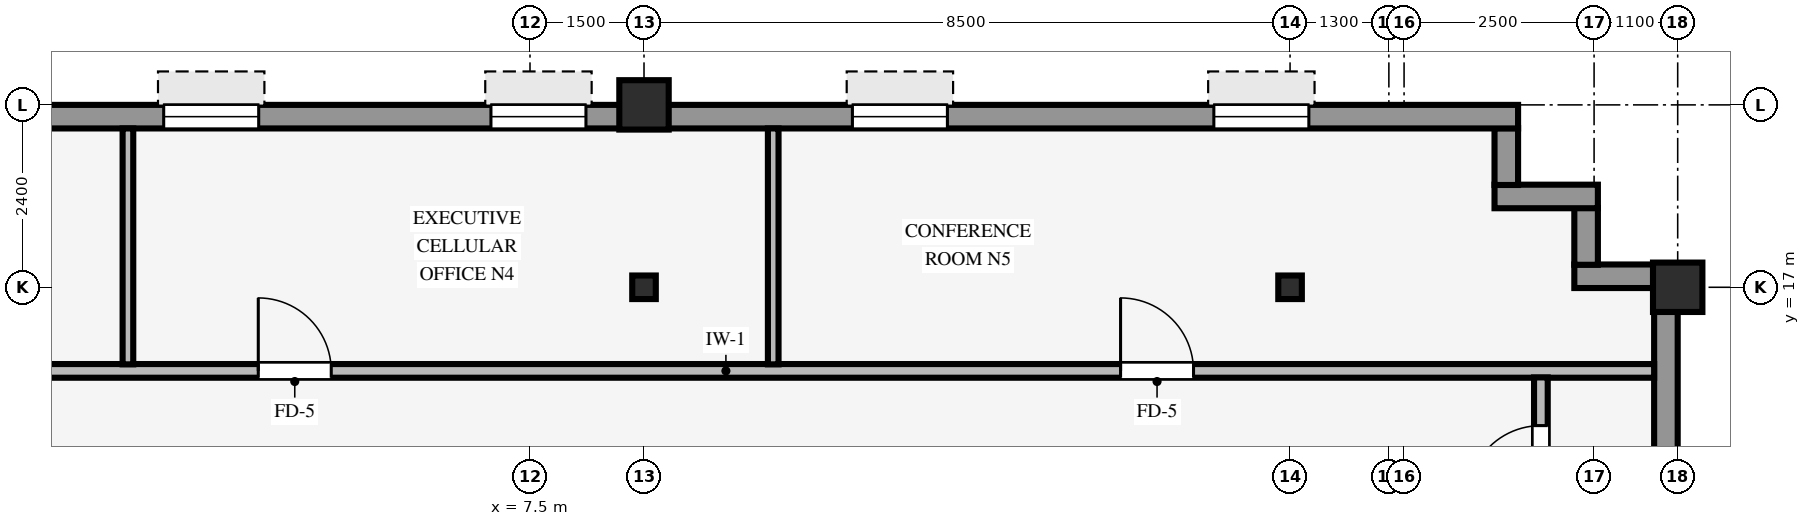
"""IFC4 building model, lengths in metres.
Left out: names, types, materials, properties, quantities, classifications, styles, units other than length and angle.
Written with IfcOpenShell. Run it as: python <this file> out.ifc"""

import sys

from ifc_helpers import new_model, si_unit, direction, frame, frame_2d, origin, origin_2d, place, context, subcontext, project, spatial, rectangle, hollow_rectangle, i_section, extrude, source, transform, mapped, element, fill, save


model = new_model("IFC4")
c1 = context("Model", 3, precision=1e-05, world=origin(), true_north=direction((0.0, 1.0)))
c2 = subcontext(c1, "Body", "Model", "MODEL_VIEW")
j1 = project(units=[si_unit("LENGTHUNIT", "METRE"), si_unit("PLANEANGLEUNIT", "RADIAN")], contexts=[c1])
p1 = place(None, origin())
s1 = spatial("IfcSite", under=j1, at=p1, CompositionType="ELEMENT")
p2 = place(p1, origin())
s2 = spatial("IfcBuilding", under=s1, at=p2, CompositionType="ELEMENT")
p3 = place(p2, frame((0.0, 0.0, 182.25)))
s3 = spatial("IfcBuildingStorey", under=s2, at=p3, CompositionType="ELEMENT", Elevation=182.25)
for number, where, z_axis, x_axis in (
    (1, (22.6, 17.0, 0.0), (0.0, 0.0, 1.0), (1.0, 0.0, 0.0)),
    (2, (9.0, 19.4, 0.0), (0.0, 0.0, 1.0), (1.0, 0.0, 0.0)),
):
    element("IfcColumn", number, at=place(p3, frame(where, z_axis=z_axis, x_axis=x_axis)), inside=s3, PredefinedType="COLUMN", context=c2, shape_type="SweptSolid", body=[
        extrude(hollow_rectangle(XDim=0.65, YDim=0.65, WallThickness=0.04, InnerFilletRadius=0.04, OuterFilletRadius=0.08, at=origin_2d()), origin(), (0.0, 0.0, 1.0), 3.25),
    ])
for number, where, z_axis, x_axis in (
    (3, (9.0, 17.0, 0.0), (0.0, 0.0, 1.0), (1.0, 0.0, 0.0)),
    (4, (17.5, 17.0, 0.0), (0.0, 0.0, 1.0), (1.0, 0.0, 0.0)),
):
    element("IfcColumn", number, at=place(p3, frame(where, z_axis=z_axis, x_axis=x_axis)), inside=s3, PredefinedType="COLUMN", context=c2, shape_type="SweptSolid", body=[
        extrude(i_section(OverallWidth=0.31, OverallDepth=0.31, WebThickness=0.015, FlangeThickness=0.015, FilletRadius=0.015, at=origin_2d()), origin(), (0.0, 0.0, 1.0), 3.25),
    ])
p4 = place(p3, frame((22.445, -20.794, 0.0), z_axis=(0.0, 0.0, 1.0), x_axis=(0.0, 1.0, 0.0)))
e5 = element("IfcWall", 5, at=p4, inside=s3, PredefinedType="STANDARD", context=c2, shape_type="SweptSolid", body=[
    extrude(rectangle(XDim=37.788, YDim=0.31, at=frame_2d((18.894, 0.0))), origin(), (0.0, 0.0, 1.0), 2.585),
])
p5 = place(p4, frame((16.444, 0.0, 0.0), z_axis=(0.0, 0.0, 1.0), x_axis=(-1.0, 0.0, 0.0)))
e6 = element("IfcOpeningElement", 6, at=p5, cuts=e5, PredefinedType="OPENING", context=c2, shape_type="SweptSolid", body=[
    extrude(rectangle(XDim=1.05, YDim=2.1, at=frame_2d((0.525, 1.05))), frame((0.0, 0.165, 0.0), z_axis=(0.0, -1.0, 0.0), x_axis=(1.0, 0.0, 0.0)), (0.0, 0.0, 1.0), 0.33),
])
p6 = place(p4, frame((7.644, 0.0, 0.8)))
e7 = element("IfcOpeningElement", 7, at=p6, cuts=e5, PredefinedType="OPENING", context=c2, shape_type="SweptSolid", body=[
    extrude(rectangle(XDim=2.05, YDim=1.52, at=frame_2d((1.025, 0.76))), frame((0.0, 0.165, 0.0), z_axis=(0.0, -1.0, 0.0), x_axis=(1.0, 0.0, 0.0)), (0.0, 0.0, 1.0), 0.33),
])
p7 = place(p4, frame((12.756, 0.0, 0.8)))
e8 = element("IfcOpeningElement", 8, at=p7, cuts=e5, PredefinedType="OPENING", context=c2, shape_type="SweptSolid", body=[
    extrude(rectangle(XDim=2.05, YDim=1.52, at=frame_2d((1.025, 0.76))), frame((0.0, 0.165, 0.0), z_axis=(0.0, -1.0, 0.0), x_axis=(1.0, 0.0, 0.0)), (0.0, 0.0, 1.0), 0.33),
])
p8 = place(p4, frame((17.869, 0.0, 0.8)))
e9 = element("IfcOpeningElement", 9, at=p8, cuts=e5, PredefinedType="OPENING", context=c2, shape_type="SweptSolid", body=[
    extrude(rectangle(XDim=2.05, YDim=1.52, at=frame_2d((1.025, 0.76))), frame((0.0, 0.165, 0.0), z_axis=(0.0, -1.0, 0.0), x_axis=(1.0, 0.0, 0.0)), (0.0, 0.0, 1.0), 0.33),
])
p9 = place(p4, frame((22.982, 0.0, 0.8)))
e10 = element("IfcOpeningElement", 10, at=p9, cuts=e5, PredefinedType="OPENING", context=c2, shape_type="SweptSolid", body=[
    extrude(rectangle(XDim=2.05, YDim=1.52, at=frame_2d((1.025, 0.76))), frame((0.0, 0.165, 0.0), z_axis=(0.0, -1.0, 0.0), x_axis=(1.0, 0.0, 0.0)), (0.0, 0.0, 1.0), 0.33),
])
p10 = place(p4, frame((27.194, 0.0, 0.8)))
e11 = element("IfcOpeningElement", 11, at=p10, cuts=e5, PredefinedType="OPENING", context=c2, shape_type="SweptSolid", body=[
    extrude(rectangle(XDim=2.05, YDim=1.52, at=frame_2d((1.025, 0.76))), frame((0.0, 0.165, 0.0), z_axis=(0.0, -1.0, 0.0), x_axis=(1.0, 0.0, 0.0)), (0.0, 0.0, 1.0), 0.33),
])
p11 = place(p4, frame((33.207, 0.0, 0.8)))
e12 = element("IfcOpeningElement", 12, at=p11, cuts=e5, PredefinedType="OPENING", context=c2, shape_type="SweptSolid", body=[
    extrude(rectangle(XDim=2.05, YDim=1.52, at=frame_2d((1.025, 0.76))), frame((0.0, 0.165, 0.0), z_axis=(0.0, -1.0, 0.0), x_axis=(1.0, 0.0, 0.0)), (0.0, 0.0, 1.0), 0.33),
])
p12 = place(p3, frame((21.24, 17.145, 0.0), z_axis=(0.0, 0.0, 1.0), x_axis=(1.0, 0.0, 0.0)))
e13 = element("IfcWall", 13, at=p12, inside=s3, PredefinedType="STANDARD", context=c2, shape_type="SweptSolid", body=[
    extrude(rectangle(XDim=1.36, YDim=0.31, at=frame_2d((0.68, 0.0))), origin(), (0.0, 0.0, 1.0), 2.335),
])
p13 = place(p3, frame((21.395, 17.296, 0.0), z_axis=(0.0, 0.0, 1.0), x_axis=(0.0, 1.0, 0.0)))
e14 = element("IfcWall", 14, at=p13, inside=s3, PredefinedType="STANDARD", context=c2, shape_type="SweptSolid", body=[
    extrude(rectangle(XDim=0.748, YDim=0.31, at=frame_2d((0.374, 0.0))), origin(), (0.0, 0.0, 1.0), 2.335),
])
p14 = place(p3, frame((20.19, 18.195, 0.0), z_axis=(0.0, 0.0, 1.0), x_axis=(1.0, 0.0, 0.0)))
e15 = element("IfcWall", 15, at=p14, inside=s3, PredefinedType="STANDARD", context=c2, shape_type="SweptSolid", body=[
    extrude(rectangle(XDim=1.36, YDim=0.31, at=frame_2d((0.68, 0.0))), origin(), (0.0, 0.0, 1.0), 2.335),
])
p15 = place(p3, frame((20.345, 18.346, 0.0), z_axis=(0.0, 0.0, 1.0), x_axis=(0.0, 1.0, 0.0)))
e16 = element("IfcWall", 16, at=p15, inside=s3, PredefinedType="STANDARD", context=c2, shape_type="SweptSolid", body=[
    extrude(rectangle(XDim=0.748, YDim=0.31, at=frame_2d((0.374, 0.0))), origin(), (0.0, 0.0, 1.0), 2.335),
])
p16 = place(p3, frame((-24.3, 19.245, 0.0), z_axis=(0.0, 0.0, 1.0), x_axis=(1.0, 0.0, 0.0)))
e17 = element("IfcWall", 17, at=p16, inside=s3, PredefinedType="STANDARD", context=c2, shape_type="SweptSolid", body=[
    extrude(rectangle(XDim=44.8, YDim=0.31, at=frame_2d((22.4, 0.0))), origin(), (0.0, 0.0, 1.0), 2.585),
])
p17 = place(p16, frame((2.753, 0.0, 0.8)))
e18 = element("IfcOpeningElement", 18, at=p17, cuts=e17, PredefinedType="OPENING", context=c2, shape_type="SweptSolid", body=[
    extrude(rectangle(XDim=1.25, YDim=1.52, at=frame_2d((0.625, 0.76))), frame((0.0, 0.165, 0.0), z_axis=(0.0, -1.0, 0.0), x_axis=(1.0, 0.0, 0.0)), (0.0, 0.0, 1.0), 0.33),
])
p18 = place(p16, frame((7.058, 0.0, 0.8)))
e19 = element("IfcOpeningElement", 19, at=p18, cuts=e17, PredefinedType="OPENING", context=c2, shape_type="SweptSolid", body=[
    extrude(rectangle(XDim=1.25, YDim=1.52, at=frame_2d((0.625, 0.76))), frame((0.0, 0.165, 0.0), z_axis=(0.0, -1.0, 0.0), x_axis=(1.0, 0.0, 0.0)), (0.0, 0.0, 1.0), 0.33),
])
p19 = place(p16, frame((12.264, 0.0, 0.8)))
e20 = element("IfcOpeningElement", 20, at=p19, cuts=e17, PredefinedType="OPENING", context=c2, shape_type="SweptSolid", body=[
    extrude(rectangle(XDim=1.25, YDim=1.52, at=frame_2d((0.625, 0.76))), frame((0.0, 0.165, 0.0), z_axis=(0.0, -1.0, 0.0), x_axis=(1.0, 0.0, 0.0)), (0.0, 0.0, 1.0), 0.33),
])
p20 = place(p16, frame((17.919, 0.0, 0.8)))
e21 = element("IfcOpeningElement", 21, at=p20, cuts=e17, PredefinedType="OPENING", context=c2, shape_type="SweptSolid", body=[
    extrude(rectangle(XDim=1.25, YDim=1.52, at=frame_2d((0.625, 0.76))), frame((0.0, 0.165, 0.0), z_axis=(0.0, -1.0, 0.0), x_axis=(1.0, 0.0, 0.0)), (0.0, 0.0, 1.0), 0.33),
])
p21 = place(p16, frame((21.775, 0.0, 0.8)))
e22 = element("IfcOpeningElement", 22, at=p21, cuts=e17, PredefinedType="OPENING", context=c2, shape_type="SweptSolid", body=[
    extrude(rectangle(XDim=1.25, YDim=1.52, at=frame_2d((0.625, 0.76))), frame((0.0, 0.165, 0.0), z_axis=(0.0, -1.0, 0.0), x_axis=(1.0, 0.0, 0.0)), (0.0, 0.0, 1.0), 0.33),
])
p22 = place(p16, frame((26.981, 0.0, 0.8)))
e23 = element("IfcOpeningElement", 23, at=p22, cuts=e17, PredefinedType="OPENING", context=c2, shape_type="SweptSolid", body=[
    extrude(rectangle(XDim=1.25, YDim=1.52, at=frame_2d((0.625, 0.76))), frame((0.0, 0.165, 0.0), z_axis=(0.0, -1.0, 0.0), x_axis=(1.0, 0.0, 0.0)), (0.0, 0.0, 1.0), 0.33),
])
p23 = place(p16, frame((31.286, 0.0, 0.8)))
e24 = element("IfcOpeningElement", 24, at=p23, cuts=e17, PredefinedType="OPENING", context=c2, shape_type="SweptSolid", body=[
    extrude(rectangle(XDim=1.25, YDim=1.52, at=frame_2d((0.625, 0.76))), frame((0.0, 0.165, 0.0), z_axis=(0.0, -1.0, 0.0), x_axis=(1.0, 0.0, 0.0)), (0.0, 0.0, 1.0), 0.33),
])
p24 = place(p16, frame((36.042, 0.0, 0.8)))
e25 = element("IfcOpeningElement", 25, at=p24, cuts=e17, PredefinedType="OPENING", context=c2, shape_type="SweptSolid", body=[
    extrude(rectangle(XDim=1.25, YDim=1.52, at=frame_2d((0.625, 0.76))), frame((0.0, 0.165, 0.0), z_axis=(0.0, -1.0, 0.0), x_axis=(1.0, 0.0, 0.0)), (0.0, 0.0, 1.0), 0.33),
])
p25 = place(p16, frame((40.797, 0.0, 0.8)))
e26 = element("IfcOpeningElement", 26, at=p25, cuts=e17, PredefinedType="OPENING", context=c2, shape_type="SweptSolid", body=[
    extrude(rectangle(XDim=1.25, YDim=1.52, at=frame_2d((0.625, 0.76))), frame((0.0, 0.165, 0.0), z_axis=(0.0, -1.0, 0.0), x_axis=(1.0, 0.0, 0.0)), (0.0, 0.0, 1.0), 0.33),
])
p26 = place(p3, frame((-26.09, 15.9, 0.0), z_axis=(0.0, 0.0, 1.0), x_axis=(1.0, 0.0, 0.0)))
e27 = element("IfcWall", 27, at=p26, inside=s3, PredefinedType="PARTITIONING", context=c2, shape_type="SweptSolid", body=[
    extrude(rectangle(XDim=48.38, YDim=0.18, at=frame_2d((24.19, 0.0))), origin(), (0.0, 0.0, 1.0), 3.24),
])
p27 = place(p26, frame((41.36, 0.0, 0.0)))
e28 = element("IfcOpeningElement", 28, at=p27, cuts=e27, PredefinedType="OPENING", context=c2, shape_type="SweptSolid", body=[
    extrude(rectangle(XDim=0.96, YDim=2.1, at=frame_2d((0.48, 1.05))), frame((0.0, 0.1, 0.0), z_axis=(0.0, -1.0, 0.0), x_axis=(1.0, 0.0, 0.0)), (0.0, 0.0, 1.0), 0.2),
])
p28 = place(p26, frame((23.35, 0.0, 0.0)))
e29 = element("IfcOpeningElement", 29, at=p28, cuts=e27, PredefinedType="OPENING", context=c2, shape_type="SweptSolid", body=[
    extrude(rectangle(XDim=0.96, YDim=2.1, at=frame_2d((0.48, 1.05))), frame((0.0, 0.1, 0.0), z_axis=(0.0, -1.0, 0.0), x_axis=(1.0, 0.0, 0.0)), (0.0, 0.0, 1.0), 0.2),
])
p29 = place(p26, frame((14.41, 0.0, 0.0)))
e30 = element("IfcOpeningElement", 30, at=p29, cuts=e27, PredefinedType="OPENING", context=c2, shape_type="SweptSolid", body=[
    extrude(rectangle(XDim=0.96, YDim=2.1, at=frame_2d((0.48, 1.05))), frame((0.0, 0.1, 0.0), z_axis=(0.0, -1.0, 0.0), x_axis=(1.0, 0.0, 0.0)), (0.0, 0.0, 1.0), 0.2),
])
p30 = place(p26, frame((30.015, 0.0, 0.0)))
e31 = element("IfcOpeningElement", 31, at=p30, cuts=e27, PredefinedType="OPENING", context=c2, shape_type="SweptSolid", body=[
    extrude(rectangle(XDim=0.96, YDim=2.1, at=frame_2d((0.48, 1.05))), frame((0.0, 0.1, 0.0), z_axis=(0.0, -1.0, 0.0), x_axis=(1.0, 0.0, 0.0)), (0.0, 0.0, 1.0), 0.2),
])
p31 = place(p26, frame((6.66, 0.0, 0.0)))
e32 = element("IfcOpeningElement", 32, at=p31, cuts=e27, PredefinedType="OPENING", context=c2, shape_type="SweptSolid", body=[
    extrude(rectangle(XDim=0.96, YDim=2.1, at=frame_2d((0.48, 1.05))), frame((0.0, 0.1, 0.0), z_axis=(0.0, -1.0, 0.0), x_axis=(1.0, 0.0, 0.0)), (0.0, 0.0, 1.0), 0.2),
])
for number, where, z_axis, x_axis in (
    (33, (2.21, 15.986, 0.0), (0.0, 0.0, 1.0), (0.0, 1.0, 0.0)),
    (34, (10.7, 15.986, 0.0), (0.0, 0.0, 1.0), (0.0, 1.0, 0.0)),
):
    element("IfcWall", number, at=place(p3, frame(where, z_axis=z_axis, x_axis=x_axis)), inside=s3, PredefinedType="PARTITIONING", context=c2, shape_type="SweptSolid", body=[
        extrude(rectangle(XDim=3.104, YDim=0.14, at=frame_2d((1.552, 0.0))), origin(), (0.0, 0.0, 1.0), 3.24),
    ])
p32 = place(p3, frame((20.8, 13.586, 0.0), z_axis=(0.0, 0.0, 1.0), x_axis=(0.0, 1.0, 0.0)))
e35 = element("IfcWall", 35, at=p32, inside=s3, PredefinedType="PARTITIONING", context=c2, shape_type="SweptSolid", body=[
    extrude(rectangle(XDim=2.228, YDim=0.18, at=frame_2d((1.114, 0.0))), origin(), (0.0, 0.0, 1.0), 3.24),
])
p33 = place(p32, frame((0.634, 0.0, 0.0)))
e36 = element("IfcOpeningElement", 36, at=p33, cuts=e35, PredefinedType="OPENING", context=c2, shape_type="SweptSolid", body=[
    extrude(rectangle(XDim=0.96, YDim=2.1, at=frame_2d((0.48, 1.05))), frame((0.0, 0.1, 0.0), z_axis=(0.0, -1.0, 0.0), x_axis=(1.0, 0.0, 0.0)), (0.0, 0.0, 1.0), 0.2),
])
m1 = source(origin(), c2, "Body", "SweptSolid", [
    extrude(rectangle(XDim=1.25, YDim=1.52, at=frame_2d((0.625, 0.76))), frame((0.0, 0.03, 0.0), z_axis=(0.0, -1.0, 0.0), x_axis=(1.0, 0.0, 0.0)), (0.0, 0.0, 1.0), 0.06),
])
p34 = place(p22, origin())
e37 = element("IfcWindow", 37, at=p34, inside=s3, PartitioningType="SINGLE_PANEL", PredefinedType="WINDOW", context=c2, shape_type="MappedRepresentation", body=[
    mapped(m1, transform((0.0, 0.0, 0.0), scale=1.0)),
])
fill(e23, e37)
p35 = place(p23, origin())
e38 = element("IfcWindow", 38, at=p35, inside=s3, PartitioningType="SINGLE_PANEL", PredefinedType="WINDOW", context=c2, shape_type="MappedRepresentation", body=[
    mapped(m1, transform((0.0, 0.0, 0.0), scale=1.0)),
])
fill(e24, e38)
p36 = place(p24, origin())
e39 = element("IfcWindow", 39, at=p36, inside=s3, PartitioningType="SINGLE_PANEL", PredefinedType="WINDOW", context=c2, shape_type="MappedRepresentation", body=[
    mapped(m1, transform((0.0, 0.0, 0.0), scale=1.0)),
])
fill(e25, e39)
p37 = place(p25, origin())
e40 = element("IfcWindow", 40, at=p37, inside=s3, PartitioningType="SINGLE_PANEL", PredefinedType="WINDOW", context=c2, shape_type="MappedRepresentation", body=[
    mapped(m1, transform((0.0, 0.0, 0.0), scale=1.0)),
])
fill(e26, e40)
m2 = source(origin(), c2, "Body", "SweptSolid", [
    extrude(rectangle(XDim=0.96, YDim=2.1, at=frame_2d((0.48, 1.05))), frame((0.0, 0.025, 0.0), z_axis=(0.0, -1.0, 0.0), x_axis=(1.0, 0.0, 0.0)), (0.0, 0.0, 1.0), 0.05),
])
p38 = place(p27, origin())
e41 = element("IfcDoor", 41, at=p38, inside=s3, OperationType="SINGLE_SWING_LEFT", PredefinedType="DOOR", context=c2, shape_type="MappedRepresentation", body=[
    mapped(m2, transform((0.0, 0.0, 0.0), scale=1.0)),
])
fill(e28, e41)
p39 = place(p30, origin())
e42 = element("IfcDoor", 42, at=p39, inside=s3, OperationType="SINGLE_SWING_LEFT", PredefinedType="DOOR", context=c2, shape_type="MappedRepresentation", body=[
    mapped(m2, transform((0.0, 0.0, 0.0), scale=1.0)),
])
fill(e31, e42)
p40 = place(p33, origin())
e43 = element("IfcDoor", 43, at=p40, inside=s3, OperationType="SINGLE_SWING_LEFT", PredefinedType="DOOR", context=c2, shape_type="MappedRepresentation", body=[
    mapped(m2, transform((0.0, 0.0, 0.0), scale=1.0)),
])
fill(e36, e43)
save(model, sys.argv[1])
